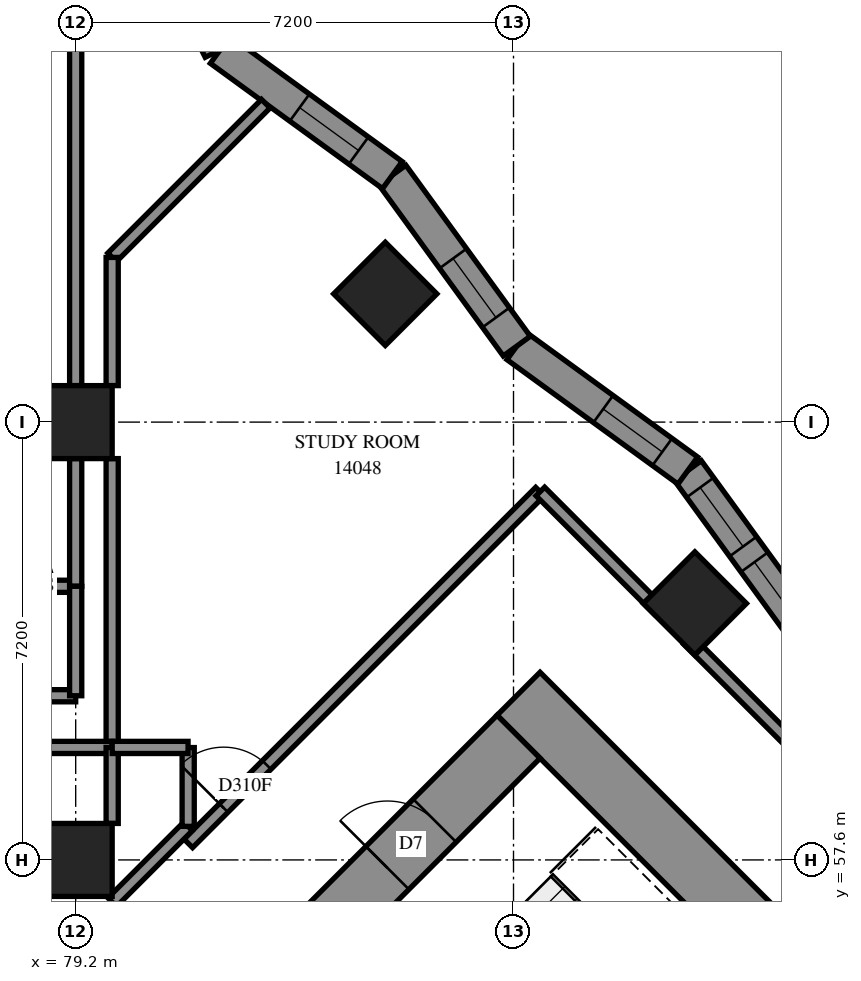
"""IFC4 building model, lengths in metres.
Left out: names, types, materials, properties, quantities, classifications, styles, units other than length and angle.
Written with IfcOpenShell. Run it as: python <this file> out.ifc"""

import sys

from ifc_helpers import new_model, si_unit, direction, frame, frame_2d, origin, origin_2d, place, context, subcontext, project, spatial, polyline, rectangle, outline, extrude, element, fill, save


model = new_model("IFC4")
c1 = context("Model", 3, precision=1e-05, world=origin(), true_north=direction((0.0, 1.0)))
c2 = subcontext(c1, "Body", "Model", "MODEL_VIEW")
j1 = project(units=[si_unit("LENGTHUNIT", "METRE"), si_unit("PLANEANGLEUNIT", "RADIAN")], contexts=[c1])
p1 = place(None, origin())
s1 = spatial("IfcSite", under=j1, at=p1, CompositionType="ELEMENT")
p2 = place(p1, origin())
s2 = spatial("IfcBuilding", under=s1, at=p2, CompositionType="ELEMENT")
p3 = place(p2, frame((0.0, 0.0, 54.2)))
s3 = spatial("IfcBuildingStorey", under=s2, at=p3, CompositionType="ELEMENT", Elevation=54.2)
for number, where, z_axis, x_axis in (
    (1, (79.2, 57.6, 0.0), (0.0, 0.0, 1.0), (1.0, 0.0, 0.0)),
    (2, (79.2, 64.8, 0.0), (0.0, 0.0, 1.0), (1.0, 0.0, 0.0)),
    (3, (84.291, 66.909, 0.0), (0.0, 0.0, 1.0), (0.707, -0.707, 0.0)),
    (4, (89.382, 61.818, 0.0), (0.0, 0.0, 1.0), (0.707, -0.707, 0.0)),
):
    element("IfcColumn", number, at=place(p3, frame(where, z_axis=z_axis, x_axis=x_axis)), inside=s3, PredefinedType="COLUMN", context=c2, shape_type="SweptSolid", body=[
        extrude(rectangle(XDim=1.2, YDim=1.2, at=origin_2d()), origin(), (0.0, 0.0, 1.0), 3.1),
    ])
p4 = place(p3, frame((86.483, 60.333, -0.3), z_axis=(0.0, 0.0, 1.0), x_axis=(0.70710983, -0.7071037324, 0.0)))
e5 = element("IfcWall", 5, at=p4, inside=s3, PredefinedType="SHEAR", context=c2, shape_type="SweptSolid", body=[
    extrude(rectangle(XDim=16.4, YDim=1.0, at=frame_2d((8.2, 0.0))), origin(), (0.0, 0.0, 1.0), 2.7),
])
p5 = place(p4, frame((11.0, 0.0, 0.3)))
e6 = element("IfcOpeningElement", 6, at=p5, cuts=e5, PredefinedType="OPENING", context=c2, shape_type="SweptSolid", body=[
    extrude(rectangle(XDim=0.8, YDim=2.1, at=frame_2d((0.4, 1.05))), frame((0.0, 0.51, 0.0), z_axis=(0.0, -1.0, 0.0), x_axis=(1.0, 0.0, 0.0)), (0.0, 0.0, 1.0), 1.02),
])
p6 = place(p3, frame((76.301, 49.443, -0.3), z_axis=(0.0, 0.0, 1.0), x_axis=(0.7071067812, 0.7071067812, 0.0)))
e7 = element("IfcWall", 7, at=p6, inside=s3, PredefinedType="SHEAR", context=c2, shape_type="SweptSolid", body=[
    extrude(rectangle(XDim=14.4, YDim=1.0, at=frame_2d((7.2, 0.0))), origin(), (0.0, 0.0, 1.0), 2.7),
])
p7 = place(p6, frame((4.55, 0.0, 0.3)))
e8 = element("IfcOpeningElement", 8, at=p7, cuts=e7, PredefinedType="OPENING", context=c2, shape_type="SweptSolid", body=[
    extrude(rectangle(XDim=1.1, YDim=2.1, at=frame_2d((0.55, 1.05))), frame((0.0, 0.51, 0.0), z_axis=(0.0, -1.0, 0.0), x_axis=(1.0, 0.0, 0.0)), (0.0, 0.0, 1.0), 1.02),
])
p8 = place(p6, frame((11.35, 0.0, 0.3)))
e9 = element("IfcOpeningElement", 9, at=p8, cuts=e7, PredefinedType="OPENING", context=c2, shape_type="SweptSolid", body=[
    extrude(rectangle(XDim=1.1, YDim=2.1, at=frame_2d((0.55, 1.05))), frame((0.0, 0.51, 0.0), z_axis=(0.0, -1.0, 0.0), x_axis=(1.0, 0.0, 0.0)), (0.0, 0.0, 1.0), 1.02),
])
p9 = place(p3, frame((91.312, 61.191, 0.0), z_axis=(0.0, 0.0, 1.0), x_axis=(-0.5882793931, 0.8086577494, 0.0)))
e10 = element("IfcWall", 10, at=p9, inside=s3, PredefinedType="SOLIDWALL", context=c2, shape_type="SweptSolid", body=[
    extrude(outline(polyline([(0.043, -0.275), (3.522, -0.275), (3.435, 0.275), (-0.043, 0.275), (0.043, -0.275)])), origin(), (0.0, 0.0, 1.0), 3.1),
])
p10 = place(p9, frame((0.415, 0.0, 0.5)))
e11 = element("IfcOpeningElement", 11, at=p10, cuts=e10, PredefinedType="OPENING", context=c2, shape_type="SweptSolid", body=[
    extrude(rectangle(XDim=1.2, YDim=2.45, at=frame_2d((0.6, 1.225))), frame((0.0, 0.285, 0.0), z_axis=(0.0, -1.0, 0.0), x_axis=(1.0, 0.0, 0.0)), (0.0, 0.0, 1.0), 0.57),
])
p11 = place(p9, frame((1.933, 0.0, 0.5)))
e12 = element("IfcOpeningElement", 12, at=p11, cuts=e10, PredefinedType="OPENING", context=c2, shape_type="SweptSolid", body=[
    extrude(rectangle(XDim=1.2, YDim=2.45, at=frame_2d((0.6, 1.225))), frame((0.0, 0.285, 0.0), z_axis=(0.0, -1.0, 0.0), x_axis=(1.0, 0.0, 0.0)), (0.0, 0.0, 1.0), 0.57),
])
p12 = place(p3, frame((89.266, 64.004, 0.0), z_axis=(0.0, 0.0, 1.0), x_axis=(-0.8086577494, 0.5882793931, 0.0)))
e13 = element("IfcWall", 13, at=p12, inside=s3, PredefinedType="SOLIDWALL", context=c2, shape_type="SweptSolid", body=[
    extrude(outline(polyline([(-0.043, -0.275), (3.435, -0.275), (3.522, 0.275), (0.043, 0.275), (-0.043, -0.275)])), origin(), (0.0, 0.0, 1.0), 3.1),
])
p13 = place(p12, frame((0.52, 0.0, 0.5)))
e14 = element("IfcOpeningElement", 14, at=p13, cuts=e13, PredefinedType="OPENING", context=c2, shape_type="SweptSolid", body=[
    extrude(rectangle(XDim=1.2, YDim=2.45, at=frame_2d((0.6, 1.225))), frame((0.0, 0.285, 0.0), z_axis=(0.0, -1.0, 0.0), x_axis=(1.0, 0.0, 0.0)), (0.0, 0.0, 1.0), 0.57),
])
p14 = place(p3, frame((86.454, 66.05, 0.0), z_axis=(0.0, 0.0, 1.0), x_axis=(-0.5882793931, 0.8086577494, 0.0)))
e15 = element("IfcWall", 15, at=p14, inside=s3, PredefinedType="SOLIDWALL", context=c2, shape_type="SweptSolid", body=[
    extrude(outline(polyline([(0.043, -0.275), (3.522, -0.275), (3.435, 0.275), (-0.043, 0.275), (0.043, -0.275)])), origin(), (0.0, 0.0, 1.0), 3.1),
])
p15 = place(p14, frame((0.582, 0.0, 0.5)))
e16 = element("IfcOpeningElement", 16, at=p15, cuts=e15, PredefinedType="OPENING", context=c2, shape_type="SweptSolid", body=[
    extrude(rectangle(XDim=1.2, YDim=2.45, at=frame_2d((0.6, 1.225))), frame((0.0, 0.285, 0.0), z_axis=(0.0, -1.0, 0.0), x_axis=(1.0, 0.0, 0.0)), (0.0, 0.0, 1.0), 0.57),
])
p16 = place(p3, frame((84.408, 68.862, 0.0), z_axis=(0.0, 0.0, 1.0), x_axis=(-0.8086607451, 0.5882752751, 0.0)))
e17 = element("IfcWall", 17, at=p16, inside=s3, PredefinedType="SOLIDWALL", context=c2, shape_type="SweptSolid", body=[
    extrude(outline(polyline([(-0.043, -0.275), (3.435, -0.275), (3.569, 0.275), (0.043, 0.275), (-0.043, -0.275)])), origin(), (0.0, 0.0, 1.0), 3.1),
])
p17 = place(p16, frame((0.686, 0.0, 0.5)))
e18 = element("IfcOpeningElement", 18, at=p17, cuts=e17, PredefinedType="OPENING", context=c2, shape_type="SweptSolid", body=[
    extrude(rectangle(XDim=1.2, YDim=2.45, at=frame_2d((0.6, 1.225))), frame((0.0, 0.285, 0.0), z_axis=(0.0, -1.0, 0.0), x_axis=(1.0, 0.0, 0.0)), (0.0, 0.0, 1.0), 0.57),
])
p18 = place(p3, frame((81.576, 70.922, 0.0), z_axis=(0.0, 0.0, 1.0), x_axis=(-0.4479656887, 0.894050749, 0.0)))
e19 = element("IfcWall", 19, at=p18, inside=s3, PredefinedType="SOLIDWALL", context=c2, shape_type="SweptSolid", body=[
    extrude(outline(polyline([(0.067, -0.275), (3.687, -0.275), (3.225, 0.275), (-0.067, 0.275), (0.067, -0.275)])), origin(), (0.0, 0.0, 1.0), 3.1),
])
p19 = place(p18, frame((0.787, 0.0, 0.5)))
e20 = element("IfcOpeningElement", 20, at=p19, cuts=e19, PredefinedType="OPENING", context=c2, shape_type="SweptSolid", body=[
    extrude(rectangle(XDim=1.2, YDim=2.45, at=frame_2d((0.6, 1.225))), frame((0.0, 0.285, 0.0), z_axis=(0.0, -1.0, 0.0), x_axis=(1.0, 0.0, 0.0)), (0.0, 0.0, 1.0), 0.57),
])
p20 = place(p3, frame((81.052, 57.873, 0.0), z_axis=(0.0, 0.0, 1.0), x_axis=(0.7071067812, 0.7071067812, 0.0)))
e21 = element("IfcWall", 21, at=p20, inside=s3, PredefinedType="PARTITIONING", context=c2, shape_type="SweptSolid", body=[
    extrude(rectangle(XDim=8.18, YDim=0.2, at=frame_2d((4.09, 0.0))), origin(), (0.0, 0.0, 1.0), 3.1),
])
p21 = place(p20, frame((0.823, 0.0, 0.0)))
e22 = element("IfcOpeningElement", 22, at=p21, cuts=e21, PredefinedType="OPENING", context=c2, shape_type="SweptSolid", body=[
    extrude(rectangle(XDim=1.0, YDim=2.1, at=frame_2d((0.5, 1.05))), frame((0.0, 0.11, 0.0), z_axis=(0.0, -1.0, 0.0), x_axis=(1.0, 0.0, 0.0)), (0.0, 0.0, 1.0), 0.22),
])
p22 = place(p3, frame((89.271, 61.215, 0.0), z_axis=(0.0, 0.0, 1.0), x_axis=(0.7071067812, -0.7071067812, 0.0)))
e23 = element("IfcWall", 23, at=p22, inside=s3, PredefinedType="PARTITIONING", context=c2, shape_type="SweptSolid", body=[
    extrude(rectangle(XDim=6.505, YDim=0.2, at=frame_2d((3.253, 0.0))), origin(), (0.0, 0.0, 1.0), 3.1),
])
p23 = place(p3, frame((79.2, 65.4, 0.0), z_axis=(0.0, 0.0, 1.0), x_axis=(0.0, 1.0, 0.0)))
e24 = element("IfcWall", 24, at=p23, inside=s3, PredefinedType="PARTITIONING", context=c2, shape_type="SweptSolid", body=[
    extrude(rectangle(XDim=6.0, YDim=0.2, at=frame_2d((3.0, 0.0))), origin(), (0.0, 0.0, 1.0), 3.1),
])
p24 = place(p3, frame((79.8, 59.45, 0.0), z_axis=(0.0, 0.0, 1.0), x_axis=(0.0, 1.0, 0.0)))
e25 = element("IfcWall", 25, at=p24, inside=s3, PredefinedType="PARTITIONING", context=c2, shape_type="SweptSolid", body=[
    extrude(rectangle(XDim=4.75, YDim=0.2, at=frame_2d((2.375, 0.0))), origin(), (0.0, 0.0, 1.0), 3.1),
])
p25 = place(p3, frame((75.102, 62.1, 0.0), z_axis=(0.0, 0.0, 1.0), x_axis=(1.0, 0.0, 0.0)))
e26 = element("IfcWall", 26, at=p25, inside=s3, PredefinedType="PARTITIONING", context=c2, shape_type="SweptSolid", body=[
    extrude(rectangle(XDim=4.098, YDim=0.2, at=frame_2d((2.049, 0.0))), origin(), (0.0, 0.0, 1.0), 3.1),
])
p26 = place(p25, frame((2.848, 0.0, 0.0)))
e27 = element("IfcOpeningElement", 27, at=p26, cuts=e26, PredefinedType="OPENING", context=c2, shape_type="SweptSolid", body=[
    extrude(rectangle(XDim=0.9, YDim=2.1, at=frame_2d((0.45, 1.05))), frame((0.0, 0.11, 0.0), z_axis=(0.0, -1.0, 0.0), x_axis=(1.0, 0.0, 0.0)), (0.0, 0.0, 1.0), 0.22),
])
p27 = place(p3, frame((79.799, 67.509, 0.0), z_axis=(0.0, 0.0, 1.0), x_axis=(0.7070927914, 0.7071207707, 0.0)))
e28 = element("IfcWall", 28, at=p27, inside=s3, PredefinedType="PARTITIONING", context=c2, shape_type="SweptSolid", body=[
    extrude(rectangle(XDim=3.574, YDim=0.2, at=frame_2d((1.787, 0.0))), origin(), (0.0, 0.0, 1.0), 3.1),
])
p28 = place(p3, frame((86.841, 63.659, 0.0), z_axis=(0.0, 0.0, 1.0), x_axis=(0.7067795096, -0.7074339014, 0.0)))
e29 = element("IfcWall", 29, at=p28, inside=s3, PredefinedType="PARTITIONING", context=c2, shape_type="SweptSolid", body=[
    extrude(rectangle(XDim=2.751, YDim=0.2, at=frame_2d((1.375, 0.0))), origin(), (0.0, 0.0, 1.0), 3.1),
])
p29 = place(p3, frame((76.902, 60.3, 0.0), z_axis=(0.0, 0.0, 1.0), x_axis=(1.0, 0.0, 0.0)))
e30 = element("IfcWall", 30, at=p29, inside=s3, PredefinedType="PARTITIONING", context=c2, shape_type="SweptSolid", body=[
    extrude(rectangle(XDim=2.298, YDim=0.2, at=frame_2d((1.149, 0.0))), origin(), (0.0, 0.0, 1.0), 3.1),
])
p30 = place(p3, frame((79.8, 65.4, 0.0), z_axis=(0.0, 0.0, 1.0), x_axis=(0.0, 1.0, 0.0)))
e31 = element("IfcWall", 31, at=p30, inside=s3, PredefinedType="PARTITIONING", context=c2, shape_type="SweptSolid", body=[
    extrude(rectangle(XDim=2.108, YDim=0.2, at=frame_2d((1.054, 0.0))), origin(), (0.0, 0.0, 1.0), 3.1),
])
p31 = place(p3, frame((79.2, 62.1, 0.0), z_axis=(0.0, 0.0, 1.0), x_axis=(0.0, 1.0, 0.0)))
e32 = element("IfcWall", 32, at=p31, inside=s3, PredefinedType="PARTITIONING", context=c2, shape_type="SweptSolid", body=[
    extrude(rectangle(XDim=2.1, YDim=0.2, at=frame_2d((1.05, 0.0))), origin(), (0.0, 0.0, 1.0), 3.1),
])
p32 = place(p3, frame((77.75, 59.45, 0.0), z_axis=(0.0, 0.0, 1.0), x_axis=(1.0, 0.0, 0.0)))
e33 = element("IfcWall", 33, at=p32, inside=s3, PredefinedType="PARTITIONING", context=c2, shape_type="SweptSolid", body=[
    extrude(rectangle(XDim=2.05, YDim=0.2, at=frame_2d((1.025, 0.0))), origin(), (0.0, 0.0, 1.0), 3.1),
])
p33 = place(p3, frame((79.2, 60.3, 0.0), z_axis=(0.0, 0.0, 1.0), x_axis=(0.0, 1.0, 0.0)))
e34 = element("IfcWall", 34, at=p33, inside=s3, PredefinedType="PARTITIONING", context=c2, shape_type="SweptSolid", body=[
    extrude(rectangle(XDim=1.8, YDim=0.2, at=frame_2d((0.9, 0.0))), origin(), (0.0, 0.0, 1.0), 3.1),
])
p34 = place(p3, frame((79.801, 56.905, 0.0), z_axis=(0.0, 0.0, 1.0), x_axis=(0.7071067812, 0.7071067812, 0.0)))
e35 = element("IfcWall", 35, at=p34, inside=s3, PredefinedType="PARTITIONING", context=c2, shape_type="SweptSolid", body=[
    extrude(rectangle(XDim=1.765, YDim=0.2, at=frame_2d((0.882, 0.0))), origin(), (0.0, 0.0, 1.0), 3.1),
])
p35 = place(p3, frame((81.05, 58.152, 0.0), z_axis=(0.0, 0.0, 1.0), x_axis=(0.0, 1.0, 0.0)))
e36 = element("IfcWall", 36, at=p35, inside=s3, PredefinedType="PARTITIONING", context=c2, shape_type="SweptSolid", body=[
    extrude(rectangle(XDim=1.296, YDim=0.2, at=frame_2d((0.648, 0.0))), origin(), (0.0, 0.0, 1.0), 3.1),
])
p36 = place(p3, frame((79.8, 58.2, 0.0), z_axis=(0.0, 0.0, 1.0), x_axis=(0.0, 1.0, 0.0)))
e37 = element("IfcWall", 37, at=p36, inside=s3, PredefinedType="PARTITIONING", context=c2, shape_type="SweptSolid", body=[
    extrude(rectangle(XDim=1.25, YDim=0.2, at=frame_2d((0.625, 0.0))), origin(), (0.0, 0.0, 1.0), 3.1),
])
p37 = place(p3, frame((79.8, 59.45, 0.0), z_axis=(0.0, 0.0, 1.0), x_axis=(1.0, 0.0, 0.0)))
e38 = element("IfcWall", 38, at=p37, inside=s3, PredefinedType="PARTITIONING", context=c2, shape_type="SweptSolid", body=[
    extrude(rectangle(XDim=1.248, YDim=0.2, at=frame_2d((0.624, 0.0))), origin(), (0.0, 0.0, 1.0), 3.1),
])
p38 = place(p10, origin())
e39 = element("IfcWindow", 39, at=p38, inside=s3, PartitioningType="SINGLE_PANEL", PredefinedType="WINDOW", context=c2, shape_type="SweptSolid", body=[
    extrude(rectangle(XDim=1.2, YDim=2.45, at=frame_2d((0.6, 1.225))), frame((0.0, 0.155, 0.0), z_axis=(0.0, -1.0, 0.0), x_axis=(1.0, 0.0, 0.0)), (0.0, 0.0, 1.0), 0.06),
])
fill(e11, e39)
p39 = place(p11, origin())
e40 = element("IfcWindow", 40, at=p39, inside=s3, PartitioningType="SINGLE_PANEL", PredefinedType="WINDOW", context=c2, shape_type="SweptSolid", body=[
    extrude(rectangle(XDim=1.2, YDim=2.45, at=frame_2d((0.6, 1.225))), frame((0.0, 0.155, 0.0), z_axis=(0.0, -1.0, 0.0), x_axis=(1.0, 0.0, 0.0)), (0.0, 0.0, 1.0), 0.06),
])
fill(e12, e40)
p40 = place(p13, origin())
e41 = element("IfcWindow", 41, at=p40, inside=s3, PartitioningType="SINGLE_PANEL", PredefinedType="WINDOW", context=c2, shape_type="SweptSolid", body=[
    extrude(rectangle(XDim=1.2, YDim=2.45, at=frame_2d((0.6, 1.225))), frame((0.0, 0.155, 0.0), z_axis=(0.0, -1.0, 0.0), x_axis=(1.0, 0.0, 0.0)), (0.0, 0.0, 1.0), 0.06),
])
fill(e14, e41)
p41 = place(p15, origin())
e42 = element("IfcWindow", 42, at=p41, inside=s3, PartitioningType="SINGLE_PANEL", PredefinedType="WINDOW", context=c2, shape_type="SweptSolid", body=[
    extrude(rectangle(XDim=1.2, YDim=2.45, at=frame_2d((0.6, 1.225))), frame((0.0, 0.155, 0.0), z_axis=(0.0, -1.0, 0.0), x_axis=(1.0, 0.0, 0.0)), (0.0, 0.0, 1.0), 0.06),
])
fill(e16, e42)
p42 = place(p17, origin())
e43 = element("IfcWindow", 43, at=p42, inside=s3, PartitioningType="SINGLE_PANEL", PredefinedType="WINDOW", context=c2, shape_type="SweptSolid", body=[
    extrude(rectangle(XDim=1.2, YDim=2.45, at=frame_2d((0.6, 1.225))), frame((0.0, 0.155, 0.0), z_axis=(0.0, -1.0, 0.0), x_axis=(1.0, 0.0, 0.0)), (0.0, 0.0, 1.0), 0.06),
])
fill(e18, e43)
p43 = place(p8, origin())
e44 = element("IfcDoor", 44, at=p43, inside=s3, OperationType="SINGLE_SWING_LEFT", PredefinedType="DOOR", context=c2, shape_type="SweptSolid", body=[
    extrude(rectangle(XDim=1.1, YDim=2.1, at=frame_2d((0.55, 1.05))), frame((0.0, 0.025, 0.0), z_axis=(0.0, -1.0, 0.0), x_axis=(1.0, 0.0, 0.0)), (0.0, 0.0, 1.0), 0.05),
])
fill(e9, e44)
p44 = place(p26, origin())
e45 = element("IfcDoor", 45, at=p44, inside=s3, OperationType="SINGLE_SWING_LEFT", PredefinedType="DOOR", context=c2, shape_type="SweptSolid", body=[
    extrude(rectangle(XDim=0.9, YDim=2.1, at=frame_2d((0.45, 1.05))), frame((0.0, 0.025, 0.0), z_axis=(0.0, -1.0, 0.0), x_axis=(1.0, 0.0, 0.0)), (0.0, 0.0, 1.0), 0.05),
])
fill(e27, e45)
p45 = place(p21, origin())
e46 = element("IfcDoor", 46, at=p45, inside=s3, OperationType="SINGLE_SWING_RIGHT", PredefinedType="DOOR", context=c2, shape_type="SweptSolid", body=[
    extrude(rectangle(XDim=1.0, YDim=2.1, at=frame_2d((0.5, 1.05))), frame((0.0, 0.025, 0.0), z_axis=(0.0, -1.0, 0.0), x_axis=(1.0, 0.0, 0.0)), (0.0, 0.0, 1.0), 0.05),
])
fill(e22, e46)
save(model, sys.argv[1])
